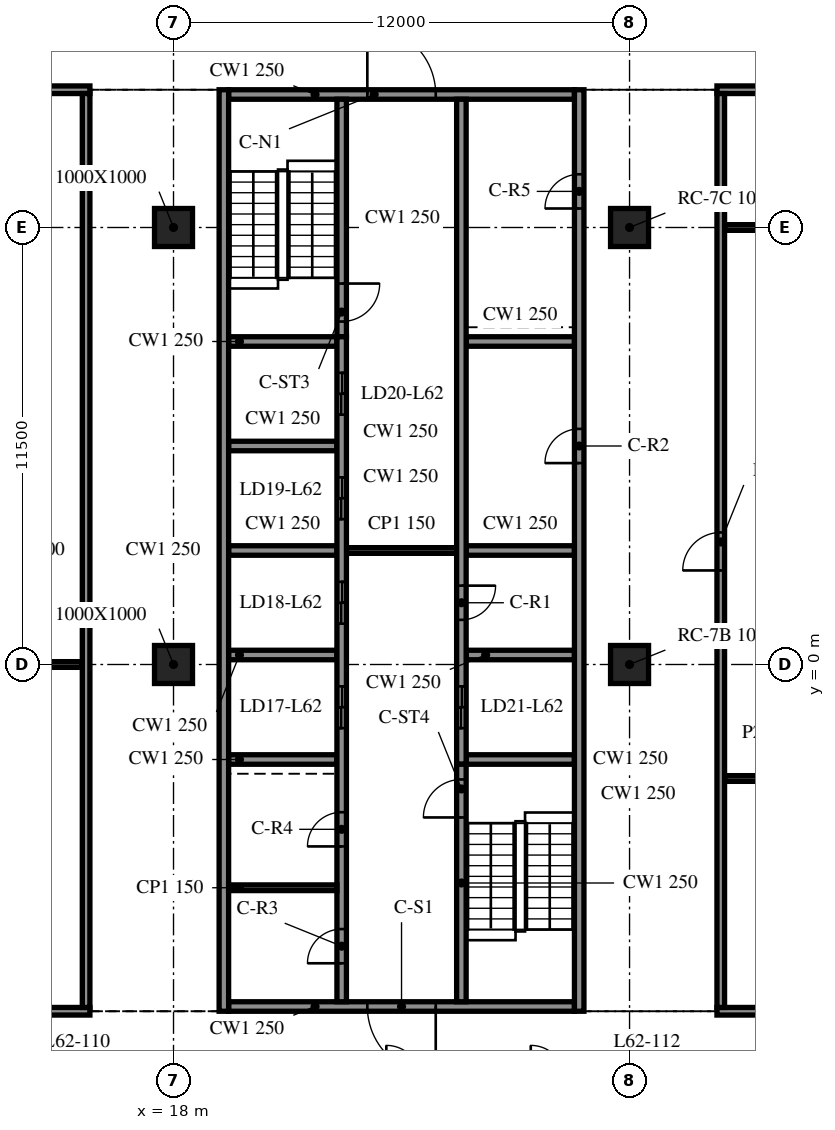
"""IFC4 building model, lengths in metres.
Left out: names, types, materials, properties, quantities, classifications, styles, units other than length and angle.
Written with IfcOpenShell. Run it as: python <this file> out.ifc"""

import sys

from ifc_helpers import new_model, si_unit, direction, frame, frame_2d, origin, origin_2d, place, context, subcontext, project, spatial, rectangle, extrude, element, fill, save


model = new_model("IFC4")
c1 = context("Model", 3, precision=1e-05, world=origin(), true_north=direction((0.0, 1.0)))
c2 = subcontext(c1, "Body", "Model", "MODEL_VIEW")
j1 = project(units=[si_unit("LENGTHUNIT", "METRE"), si_unit("PLANEANGLEUNIT", "RADIAN")], contexts=[c1])
p1 = place(None, origin())
s1 = spatial("IfcSite", under=j1, at=p1, CompositionType="ELEMENT")
p2 = place(p1, origin())
s2 = spatial("IfcBuilding", under=s1, at=p2, CompositionType="ELEMENT")
p3 = place(p2, frame((0.0, 0.0, 255.2)))
s3 = spatial("IfcBuildingStorey", under=s2, at=p3, CompositionType="ELEMENT", Elevation=255.2)
for number, where, z_axis, x_axis in (
    (1, (18.0, 0.0, -0.34), (0.0, 0.0, 1.0), (1.0, 0.0, 0.0)),
    (2, (18.0, 11.5, -0.34), (0.0, 0.0, 1.0), (1.0, 0.0, 0.0)),
    (3, (30.0, 0.0, -0.34), (0.0, 0.0, 1.0), (1.0, 0.0, 0.0)),
    (4, (30.0, 11.5, -0.34), (0.0, 0.0, 1.0), (1.0, 0.0, 0.0)),
):
    element("IfcColumn", number, at=place(p3, frame(where, z_axis=z_axis, x_axis=x_axis)), inside=s3, PredefinedType="COLUMN", context=c2, shape_type="SweptSolid", body=[
        extrude(rectangle(XDim=1.0, YDim=1.0, at=origin_2d()), origin(), (0.0, 0.0, 1.0), 3.74),
    ])
p4 = place(p3, frame((19.325, 15.125, 0.0), z_axis=(0.0, 0.0, 1.0), x_axis=(0.0, -1.0, 0.0)))
e5 = element("IfcWall", 5, at=p4, inside=s3, PredefinedType="SOLIDWALL", context=c2, shape_type="SweptSolid", body=[
    extrude(rectangle(XDim=24.25, YDim=0.25, at=frame_2d((12.125, 0.0))), origin(), (0.0, 0.0, 1.0), 3.4),
])
p5 = place(p3, frame((28.675, -9.125, 0.0), z_axis=(0.0, 0.0, 1.0), x_axis=(0.0, 1.0, 0.0)))
e6 = element("IfcWall", 6, at=p5, inside=s3, PredefinedType="SOLIDWALL", context=c2, shape_type="SweptSolid", body=[
    extrude(rectangle(XDim=24.25, YDim=0.25, at=frame_2d((12.125, 0.0))), origin(), (0.0, 0.0, 1.0), 3.4),
])
p6 = place(p5, frame((14.425, 0.0, 0.0)))
e7 = element("IfcOpeningElement", 7, at=p6, cuts=e6, PredefinedType="OPENING", context=c2, shape_type="SweptSolid", body=[
    extrude(rectangle(XDim=0.9, YDim=2.1, at=frame_2d((0.45, 1.05))), frame((0.0, 0.135, 0.0), z_axis=(0.0, -1.0, 0.0), x_axis=(1.0, 0.0, 0.0)), (0.0, 0.0, 1.0), 0.27),
])
p7 = place(p5, frame((21.125, 0.0, 0.0)))
e8 = element("IfcOpeningElement", 8, at=p7, cuts=e6, PredefinedType="OPENING", context=c2, shape_type="SweptSolid", body=[
    extrude(rectangle(XDim=0.9, YDim=2.1, at=frame_2d((0.45, 1.05))), frame((0.0, 0.135, 0.0), z_axis=(0.0, -1.0, 0.0), x_axis=(1.0, 0.0, 0.0)), (0.0, 0.0, 1.0), 0.27),
])
p8 = place(p3, frame((28.55, -9.0, 0.0), z_axis=(0.0, 0.0, 1.0), x_axis=(-1.0, 0.0, 0.0)))
e9 = element("IfcWall", 9, at=p8, inside=s3, PredefinedType="SOLIDWALL", context=c2, shape_type="SweptSolid", body=[
    extrude(rectangle(XDim=9.1, YDim=0.25, at=frame_2d((4.55, 0.0))), origin(), (0.0, 0.0, 1.0), 3.4),
])
p9 = place(p8, frame((3.65, 0.0, 0.0)))
e10 = element("IfcOpeningElement", 10, at=p9, cuts=e9, PredefinedType="OPENING", context=c2, shape_type="SweptSolid", body=[
    extrude(rectangle(XDim=1.8, YDim=2.1, at=frame_2d((0.9, 1.05))), frame((0.0, 0.135, 0.0), z_axis=(0.0, -1.0, 0.0), x_axis=(1.0, 0.0, 0.0)), (0.0, 0.0, 1.0), 0.27),
])
p10 = place(p3, frame((19.45, 15.0, 0.0), z_axis=(0.0, 0.0, 1.0), x_axis=(1.0, 0.0, 0.0)))
e11 = element("IfcWall", 11, at=p10, inside=s3, PredefinedType="SOLIDWALL", context=c2, shape_type="SweptSolid", body=[
    extrude(rectangle(XDim=9.1, YDim=0.25, at=frame_2d((4.55, 0.0))), origin(), (0.0, 0.0, 1.0), 3.4),
])
p11 = place(p10, frame((3.65, 0.0, 0.0)))
e12 = element("IfcOpeningElement", 12, at=p11, cuts=e11, PredefinedType="OPENING", context=c2, shape_type="SweptSolid", body=[
    extrude(rectangle(XDim=1.8, YDim=2.1, at=frame_2d((0.9, 1.05))), frame((0.0, 0.135, 0.0), z_axis=(0.0, -1.0, 0.0), x_axis=(1.0, 0.0, 0.0)), (0.0, 0.0, 1.0), 0.27),
])
p12 = place(p3, frame((22.425, -8.875, 0.0), z_axis=(0.0, 0.0, 1.0), x_axis=(0.0, 1.0, 0.0)))
e13 = element("IfcWall", 13, at=p12, inside=s3, PredefinedType="SOLIDWALL", context=c2, shape_type="SweptSolid", body=[
    extrude(rectangle(XDim=17.5, YDim=0.25, at=frame_2d((8.75, 0.0))), origin(), (0.0, 0.0, 1.0), 3.4),
])
p13 = place(p12, frame((7.2, 0.0, 0.0)))
e14 = element("IfcOpeningElement", 14, at=p13, cuts=e13, PredefinedType="OPENING", context=c2, shape_type="SweptSolid", body=[
    extrude(rectangle(XDim=1.1, YDim=2.1, at=frame_2d((0.55, 1.05))), frame((0.0, 0.135, 0.0), z_axis=(0.0, -1.0, 0.0), x_axis=(1.0, 0.0, 0.0)), (0.0, 0.0, 1.0), 0.27),
])
p14 = place(p12, frame((9.95, 0.0, 0.0)))
e15 = element("IfcOpeningElement", 15, at=p14, cuts=e13, PredefinedType="OPENING", context=c2, shape_type="SweptSolid", body=[
    extrude(rectangle(XDim=1.1, YDim=2.1, at=frame_2d((0.55, 1.05))), frame((0.0, 0.135, 0.0), z_axis=(0.0, -1.0, 0.0), x_axis=(1.0, 0.0, 0.0)), (0.0, 0.0, 1.0), 0.27),
])
p15 = place(p12, frame((12.7, 0.0, 0.0)))
e16 = element("IfcOpeningElement", 16, at=p15, cuts=e13, PredefinedType="OPENING", context=c2, shape_type="SweptSolid", body=[
    extrude(rectangle(XDim=1.1, YDim=2.1, at=frame_2d((0.55, 1.05))), frame((0.0, 0.135, 0.0), z_axis=(0.0, -1.0, 0.0), x_axis=(1.0, 0.0, 0.0)), (0.0, 0.0, 1.0), 0.27),
])
p16 = place(p12, frame((15.45, 0.0, 0.0)))
e17 = element("IfcOpeningElement", 17, at=p16, cuts=e13, PredefinedType="OPENING", context=c2, shape_type="SweptSolid", body=[
    extrude(rectangle(XDim=1.1, YDim=2.1, at=frame_2d((0.55, 1.05))), frame((0.0, 0.135, 0.0), z_axis=(0.0, -1.0, 0.0), x_axis=(1.0, 0.0, 0.0)), (0.0, 0.0, 1.0), 0.27),
])
p17 = place(p12, frame((1.012, 0.0, 0.0)))
e18 = element("IfcOpeningElement", 18, at=p17, cuts=e13, PredefinedType="OPENING", context=c2, shape_type="SweptSolid", body=[
    extrude(rectangle(XDim=0.9, YDim=2.1, at=frame_2d((0.45, 1.05))), frame((0.0, 0.135, 0.0), z_axis=(0.0, -1.0, 0.0), x_axis=(1.0, 0.0, 0.0)), (0.0, 0.0, 1.0), 0.27),
])
p18 = place(p12, frame((4.087, 0.0, 0.0)))
e19 = element("IfcOpeningElement", 19, at=p18, cuts=e13, PredefinedType="OPENING", context=c2, shape_type="SweptSolid", body=[
    extrude(rectangle(XDim=0.9, YDim=2.1, at=frame_2d((0.45, 1.05))), frame((0.0, 0.135, 0.0), z_axis=(0.0, -1.0, 0.0), x_axis=(1.0, 0.0, 0.0)), (0.0, 0.0, 1.0), 0.27),
])
p19 = place(p3, frame((22.425, 14.875, 0.0), z_axis=(0.0, 0.0, 1.0), x_axis=(0.0, -1.0, 0.0)))
e20 = element("IfcWall", 20, at=p19, inside=s3, PredefinedType="SOLIDWALL", context=c2, shape_type="SweptSolid", body=[
    extrude(rectangle(XDim=6.25, YDim=0.25, at=frame_2d((3.125, 0.0))), origin(), (0.0, 0.0, 1.0), 3.4),
])
p20 = place(p19, frame((4.85, 0.0, 0.0)))
e21 = element("IfcOpeningElement", 21, at=p20, cuts=e20, PredefinedType="OPENING", context=c2, shape_type="SweptSolid", body=[
    extrude(rectangle(XDim=1.0, YDim=2.1, at=frame_2d((0.5, 1.05))), frame((0.0, 0.135, 0.0), z_axis=(0.0, -1.0, 0.0), x_axis=(1.0, 0.0, 0.0)), (0.0, 0.0, 1.0), 0.27),
])
p21 = place(p3, frame((25.575, -8.875, 0.0), z_axis=(0.0, 0.0, 1.0), x_axis=(0.0, 1.0, 0.0)))
e22 = element("IfcWall", 22, at=p21, inside=s3, PredefinedType="SOLIDWALL", context=c2, shape_type="SweptSolid", body=[
    extrude(rectangle(XDim=6.25, YDim=0.25, at=frame_2d((3.125, 0.0))), origin(), (0.0, 0.0, 1.0), 3.4),
])
p22 = place(p21, frame((4.85, 0.0, 0.0)))
e23 = element("IfcOpeningElement", 23, at=p22, cuts=e22, PredefinedType="OPENING", context=c2, shape_type="SweptSolid", body=[
    extrude(rectangle(XDim=1.0, YDim=2.1, at=frame_2d((0.5, 1.05))), frame((0.0, 0.135, 0.0), z_axis=(0.0, -1.0, 0.0), x_axis=(1.0, 0.0, 0.0)), (0.0, 0.0, 1.0), 0.27),
])
p23 = place(p3, frame((25.575, 14.875, 0.0), z_axis=(0.0, 0.0, 1.0), x_axis=(0.0, -1.0, 0.0)))
e24 = element("IfcWall", 24, at=p23, inside=s3, PredefinedType="SOLIDWALL", context=c2, shape_type="SweptSolid", body=[
    extrude(rectangle(XDim=17.5, YDim=0.25, at=frame_2d((8.75, 0.0))), origin(), (0.0, 0.0, 1.0), 3.4),
])
p24 = place(p23, frame((15.45, 0.0, 0.0)))
e25 = element("IfcOpeningElement", 25, at=p24, cuts=e24, PredefinedType="OPENING", context=c2, shape_type="SweptSolid", body=[
    extrude(rectangle(XDim=1.1, YDim=2.1, at=frame_2d((0.55, 1.05))), frame((0.0, 0.135, 0.0), z_axis=(0.0, -1.0, 0.0), x_axis=(1.0, 0.0, 0.0)), (0.0, 0.0, 1.0), 0.27),
])
p25 = place(p23, frame((12.8, 0.0, 0.0)))
e26 = element("IfcOpeningElement", 26, at=p25, cuts=e24, PredefinedType="OPENING", context=c2, shape_type="SweptSolid", body=[
    extrude(rectangle(XDim=0.9, YDim=2.1, at=frame_2d((0.45, 1.05))), frame((0.0, 0.135, 0.0), z_axis=(0.0, -1.0, 0.0), x_axis=(1.0, 0.0, 0.0)), (0.0, 0.0, 1.0), 0.27),
])
for number, where, z_axis, x_axis in (
    (27, (19.45, -2.5, 0.0), (0.0, 0.0, 1.0), (1.0, 0.0, 0.0)),
    (28, (19.45, 0.25, 0.0), (0.0, 0.0, 1.0), (1.0, 0.0, 0.0)),
    (29, (19.45, 3.0, 0.0), (0.0, 0.0, 1.0), (1.0, 0.0, 0.0)),
    (30, (19.45, 5.75, 0.0), (0.0, 0.0, 1.0), (1.0, 0.0, 0.0)),
    (31, (19.45, 8.5, 0.0), (0.0, 0.0, 1.0), (1.0, 0.0, 0.0)),
    (32, (25.7, -2.5, 0.0), (0.0, 0.0, 1.0), (1.0, 0.0, 0.0)),
    (33, (25.7, 0.25, 0.0), (0.0, 0.0, 1.0), (1.0, 0.0, 0.0)),
    (34, (25.7, 3.0, 0.0), (0.0, 0.0, 1.0), (1.0, 0.0, 0.0)),
    (35, (25.7, 8.5, 0.0), (0.0, 0.0, 1.0), (1.0, 0.0, 0.0)),
):
    element("IfcWall", number, at=place(p3, frame(where, z_axis=z_axis, x_axis=x_axis)), inside=s3, PredefinedType="SOLIDWALL", context=c2, shape_type="SweptSolid", body=[
        extrude(rectangle(XDim=2.85, YDim=0.25, at=frame_2d((1.425, 0.0))), origin(), (0.0, 0.0, 1.0), 3.4),
    ])
p26 = place(p3, frame((22.55, 3.0, 0.0), z_axis=(0.0, 0.0, 1.0), x_axis=(1.0, 0.0, 0.0)))
e36 = element("IfcWall", 36, at=p26, inside=s3, PredefinedType="PARTITIONING", context=c2, shape_type="SweptSolid", body=[
    extrude(rectangle(XDim=2.9, YDim=0.15, at=frame_2d((1.45, 0.0))), origin(), (0.0, 0.0, 1.0), 3.4),
])
p27 = place(p3, frame((19.45, -5.875, 0.0), z_axis=(0.0, 0.0, 1.0), x_axis=(1.0, 0.0, 0.0)))
e37 = element("IfcWall", 37, at=p27, inside=s3, PredefinedType="PARTITIONING", context=c2, shape_type="SweptSolid", body=[
    extrude(rectangle(XDim=2.85, YDim=0.15, at=frame_2d((1.425, 0.0))), origin(), (0.0, 0.0, 1.0), 3.4),
])
p28 = place(p3, frame((8.1, -9.125, 0.0), z_axis=(0.0, 0.0, 1.0), x_axis=(1.0, 0.0, 0.0)))
e38 = element("IfcWall", 38, at=p28, inside=s3, PredefinedType="PARTITIONING", context=c2, shape_type="SweptSolid", body=[
    extrude(rectangle(XDim=7.7, YDim=0.2, at=frame_2d((3.85, 0.0))), origin(), (0.0, 0.0, 1.0), 3.4),
])
p29 = place(p28, frame((3.3, 0.0, 0.0)))
e39 = element("IfcOpeningElement", 39, at=p29, cuts=e38, PredefinedType="OPENING", context=c2, shape_type="SweptSolid", body=[
    extrude(rectangle(XDim=0.9, YDim=2.1, at=frame_2d((0.45, 1.05))), frame((0.0, 0.11, 0.0), z_axis=(0.0, -1.0, 0.0), x_axis=(1.0, 0.0, 0.0)), (0.0, 0.0, 1.0), 0.22),
])
p30 = place(p3, frame((32.3, -9.125, 0.0), z_axis=(0.0, 0.0, 1.0), x_axis=(1.0, 0.0, 0.0)))
e40 = element("IfcWall", 40, at=p30, inside=s3, PredefinedType="PARTITIONING", context=c2, shape_type="SweptSolid", body=[
    extrude(rectangle(XDim=21.417, YDim=0.2, at=frame_2d((10.708, 0.0))), origin(), (0.0, 0.0, 1.0), 3.4),
])
p31 = place(p30, frame((10.3, 0.0, 0.0)))
e41 = element("IfcOpeningElement", 41, at=p31, cuts=e40, PredefinedType="OPENING", context=c2, shape_type="SweptSolid", body=[
    extrude(rectangle(XDim=1.0, YDim=2.1, at=frame_2d((0.5, 1.05))), frame((0.0, 0.11, 0.0), z_axis=(0.0, -1.0, 0.0), x_axis=(1.0, 0.0, 0.0)), (0.0, 0.0, 1.0), 0.22),
])
p32 = place(p3, frame((32.5, -3.0, 0.0), z_axis=(0.0, 0.0, 1.0), x_axis=(1.0, 0.0, 0.0)))
e42 = element("IfcWall", 42, at=p32, inside=s3, PredefinedType="PARTITIONING", context=c2, shape_type="SweptSolid", body=[
    extrude(rectangle(XDim=21.475, YDim=0.15, at=frame_2d((10.738, 0.0))), origin(), (0.0, 0.0, 1.0), 3.4),
])
p33 = place(p3, frame((8.3, 0.0, 0.0), z_axis=(0.0, 0.0, 1.0), x_axis=(1.0, 0.0, 0.0)))
e43 = element("IfcWall", 43, at=p33, inside=s3, PredefinedType="PARTITIONING", context=c2, shape_type="SweptSolid", body=[
    extrude(rectangle(XDim=7.3, YDim=0.15, at=frame_2d((3.65, 0.0))), origin(), (0.0, 0.0, 1.0), 3.4),
])
p34 = place(p3, frame((32.5, 11.5, 0.0), z_axis=(0.0, 0.0, 1.0), x_axis=(1.0, 0.0, 0.0)))
e44 = element("IfcWall", 44, at=p34, inside=s3, PredefinedType="PARTITIONING", context=c2, shape_type="SweptSolid", body=[
    extrude(rectangle(XDim=9.0, YDim=0.15, at=frame_2d((4.5, 0.0))), origin(), (0.0, 0.0, 1.0), 2.401),
])
p35 = place(p3, frame((8.1, 15.125, 0.0), z_axis=(0.0, 0.0, 1.0), x_axis=(1.0, 0.0, 0.0)))
e45 = element("IfcWall", 45, at=p35, inside=s3, PredefinedType="PARTITIONING", context=c2, shape_type="SweptSolid", body=[
    extrude(rectangle(XDim=7.7, YDim=0.2, at=frame_2d((3.85, 0.0))), origin(), (0.0, 0.0, 1.0), 3.4),
])
p36 = place(p3, frame((32.3, 15.125, 0.0), z_axis=(0.0, 0.0, 1.0), x_axis=(1.0, 0.0, 0.0)))
e46 = element("IfcWall", 46, at=p36, inside=s3, PredefinedType="PARTITIONING", context=c2, shape_type="SweptSolid", body=[
    extrude(rectangle(XDim=21.675, YDim=0.2, at=frame_2d((10.837, 0.0))), origin(), (0.0, 0.0, 1.0), 3.4),
])
p37 = place(p36, frame((10.3, 0.0, 0.0)))
e47 = element("IfcOpeningElement", 47, at=p37, cuts=e46, PredefinedType="OPENING", context=c2, shape_type="SweptSolid", body=[
    extrude(rectangle(XDim=0.9, YDim=2.1, at=frame_2d((0.45, 1.05))), frame((0.0, 0.11, 0.0), z_axis=(0.0, -1.0, 0.0), x_axis=(1.0, 0.0, 0.0)), (0.0, 0.0, 1.0), 0.22),
])
p38 = place(p3, frame((15.7, -9.025, 0.0), z_axis=(0.0, 0.0, 1.0), x_axis=(0.0, 1.0, 0.0)))
e48 = element("IfcWall", 48, at=p38, inside=s3, PredefinedType="PARTITIONING", context=c2, shape_type="SweptSolid", body=[
    extrude(rectangle(XDim=24.05, YDim=0.2, at=frame_2d((12.025, 0.0))), origin(), (0.0, 0.0, 1.0), 3.4),
])
p39 = place(p3, frame((32.4, -9.025, 0.0), z_axis=(0.0, 0.0, 1.0), x_axis=(0.0, 1.0, 0.0)))
e49 = element("IfcWall", 49, at=p39, inside=s3, PredefinedType="PARTITIONING", context=c2, shape_type="SweptSolid", body=[
    extrude(rectangle(XDim=24.05, YDim=0.2, at=frame_2d((12.025, 0.0))), origin(), (0.0, 0.0, 1.0), 3.4),
])
p40 = place(p39, frame((11.5, 0.0, 0.0)))
e50 = element("IfcOpeningElement", 50, at=p40, cuts=e49, PredefinedType="OPENING", context=c2, shape_type="SweptSolid", body=[
    extrude(rectangle(XDim=1.0, YDim=2.1, at=frame_2d((0.5, 1.05))), frame((0.0, 0.11, 0.0), z_axis=(0.0, -1.0, 0.0), x_axis=(1.0, 0.0, 0.0)), (0.0, 0.0, 1.0), 0.22),
])
p41 = place(p9, origin())
e51 = element("IfcDoor", 51, at=p41, inside=s3, OperationType="DOUBLE_DOOR_SINGLE_SWING", PredefinedType="DOOR", context=c2, shape_type="SweptSolid", body=[
    extrude(rectangle(XDim=1.8, YDim=2.1, at=frame_2d((0.9, 1.05))), frame((0.0, 0.025, 0.0), z_axis=(0.0, -1.0, 0.0), x_axis=(1.0, 0.0, 0.0)), (0.0, 0.0, 1.0), 0.05),
])
fill(e10, e51)
p42 = place(p11, origin())
e52 = element("IfcDoor", 52, at=p42, inside=s3, OperationType="DOUBLE_DOOR_SINGLE_SWING", PredefinedType="DOOR", context=c2, shape_type="SweptSolid", body=[
    extrude(rectangle(XDim=1.8, YDim=2.1, at=frame_2d((0.9, 1.05))), frame((0.0, 0.025, 0.0), z_axis=(0.0, -1.0, 0.0), x_axis=(1.0, 0.0, 0.0)), (0.0, 0.0, 1.0), 0.05),
])
fill(e12, e52)
p43 = place(p24, origin())
e53 = element("IfcDoor", 53, at=p43, inside=s3, OperationType="DOUBLE_DOOR_SLIDING", PredefinedType="DOOR", context=c2, shape_type="SweptSolid", body=[
    extrude(rectangle(XDim=1.1, YDim=2.1, at=frame_2d((0.55, 1.05))), frame((0.0, 0.025, 0.0), z_axis=(0.0, -1.0, 0.0), x_axis=(1.0, 0.0, 0.0)), (0.0, 0.0, 1.0), 0.05),
])
fill(e25, e53)
p44 = place(p13, origin())
e54 = element("IfcDoor", 54, at=p44, inside=s3, OperationType="DOUBLE_DOOR_SLIDING", PredefinedType="DOOR", context=c2, shape_type="SweptSolid", body=[
    extrude(rectangle(XDim=1.1, YDim=2.1, at=frame_2d((0.55, 1.05))), frame((0.0, 0.025, 0.0), z_axis=(0.0, -1.0, 0.0), x_axis=(1.0, 0.0, 0.0)), (0.0, 0.0, 1.0), 0.05),
])
fill(e14, e54)
p45 = place(p14, origin())
e55 = element("IfcDoor", 55, at=p45, inside=s3, OperationType="DOUBLE_DOOR_SLIDING", PredefinedType="DOOR", context=c2, shape_type="SweptSolid", body=[
    extrude(rectangle(XDim=1.1, YDim=2.1, at=frame_2d((0.55, 1.05))), frame((0.0, 0.025, 0.0), z_axis=(0.0, -1.0, 0.0), x_axis=(1.0, 0.0, 0.0)), (0.0, 0.0, 1.0), 0.05),
])
fill(e15, e55)
p46 = place(p15, origin())
e56 = element("IfcDoor", 56, at=p46, inside=s3, OperationType="DOUBLE_DOOR_SLIDING", PredefinedType="DOOR", context=c2, shape_type="SweptSolid", body=[
    extrude(rectangle(XDim=1.1, YDim=2.1, at=frame_2d((0.55, 1.05))), frame((0.0, 0.025, 0.0), z_axis=(0.0, -1.0, 0.0), x_axis=(1.0, 0.0, 0.0)), (0.0, 0.0, 1.0), 0.05),
])
fill(e16, e56)
p47 = place(p16, origin())
e57 = element("IfcDoor", 57, at=p47, inside=s3, OperationType="DOUBLE_DOOR_SLIDING", PredefinedType="DOOR", context=c2, shape_type="SweptSolid", body=[
    extrude(rectangle(XDim=1.1, YDim=2.1, at=frame_2d((0.55, 1.05))), frame((0.0, 0.025, 0.0), z_axis=(0.0, -1.0, 0.0), x_axis=(1.0, 0.0, 0.0)), (0.0, 0.0, 1.0), 0.05),
])
fill(e17, e57)
p48 = place(p25, origin())
e58 = element("IfcDoor", 58, at=p48, inside=s3, OperationType="SINGLE_SWING_LEFT", PredefinedType="DOOR", context=c2, shape_type="SweptSolid", body=[
    extrude(rectangle(XDim=0.9, YDim=2.1, at=frame_2d((0.45, 1.05))), frame((0.0, 0.025, 0.0), z_axis=(0.0, -1.0, 0.0), x_axis=(1.0, 0.0, 0.0)), (0.0, 0.0, 1.0), 0.05),
])
fill(e26, e58)
p49 = place(p6, origin())
e59 = element("IfcDoor", 59, at=p49, inside=s3, OperationType="SINGLE_SWING_RIGHT", PredefinedType="DOOR", context=c2, shape_type="SweptSolid", body=[
    extrude(rectangle(XDim=0.9, YDim=2.1, at=frame_2d((0.45, 1.05))), frame((0.0, 0.025, 0.0), z_axis=(0.0, -1.0, 0.0), x_axis=(1.0, 0.0, 0.0)), (0.0, 0.0, 1.0), 0.05),
])
fill(e7, e59)
p50 = place(p17, origin())
e60 = element("IfcDoor", 60, at=p50, inside=s3, OperationType="SINGLE_SWING_LEFT", PredefinedType="DOOR", context=c2, shape_type="SweptSolid", body=[
    extrude(rectangle(XDim=0.9, YDim=2.1, at=frame_2d((0.45, 1.05))), frame((0.0, 0.025, 0.0), z_axis=(0.0, -1.0, 0.0), x_axis=(1.0, 0.0, 0.0)), (0.0, 0.0, 1.0), 0.05),
])
fill(e18, e60)
p51 = place(p18, origin())
e61 = element("IfcDoor", 61, at=p51, inside=s3, OperationType="SINGLE_SWING_RIGHT", PredefinedType="DOOR", context=c2, shape_type="SweptSolid", body=[
    extrude(rectangle(XDim=0.9, YDim=2.1, at=frame_2d((0.45, 1.05))), frame((0.0, 0.025, 0.0), z_axis=(0.0, -1.0, 0.0), x_axis=(1.0, 0.0, 0.0)), (0.0, 0.0, 1.0), 0.05),
])
fill(e19, e61)
p52 = place(p7, origin())
e62 = element("IfcDoor", 62, at=p52, inside=s3, OperationType="SINGLE_SWING_LEFT", PredefinedType="DOOR", context=c2, shape_type="SweptSolid", body=[
    extrude(rectangle(XDim=0.9, YDim=2.1, at=frame_2d((0.45, 1.05))), frame((0.0, 0.025, 0.0), z_axis=(0.0, -1.0, 0.0), x_axis=(1.0, 0.0, 0.0)), (0.0, 0.0, 1.0), 0.05),
])
fill(e8, e62)
p53 = place(p20, origin())
e63 = element("IfcDoor", 63, at=p53, inside=s3, OperationType="SINGLE_SWING_RIGHT", PredefinedType="DOOR", context=c2, shape_type="SweptSolid", body=[
    extrude(rectangle(XDim=1.0, YDim=2.1, at=frame_2d((0.5, 1.05))), frame((0.0, 0.025, 0.0), z_axis=(0.0, -1.0, 0.0), x_axis=(1.0, 0.0, 0.0)), (0.0, 0.0, 1.0), 0.05),
])
fill(e21, e63)
p54 = place(p22, origin())
e64 = element("IfcDoor", 64, at=p54, inside=s3, OperationType="SINGLE_SWING_LEFT", PredefinedType="DOOR", context=c2, shape_type="SweptSolid", body=[
    extrude(rectangle(XDim=1.0, YDim=2.1, at=frame_2d((0.5, 1.05))), frame((0.0, 0.025, 0.0), z_axis=(0.0, -1.0, 0.0), x_axis=(1.0, 0.0, 0.0)), (0.0, 0.0, 1.0), 0.05),
])
fill(e23, e64)
p55 = place(p40, origin())
e65 = element("IfcDoor", 65, at=p55, inside=s3, OperationType="SINGLE_SWING_RIGHT", PredefinedType="DOOR", context=c2, shape_type="SweptSolid", body=[
    extrude(rectangle(XDim=1.0, YDim=2.1, at=frame_2d((0.5, 1.05))), frame((0.0, 0.025, 0.0), z_axis=(0.0, -1.0, 0.0), x_axis=(1.0, 0.0, 0.0)), (0.0, 0.0, 1.0), 0.05),
])
fill(e50, e65)
save(model, sys.argv[1])
